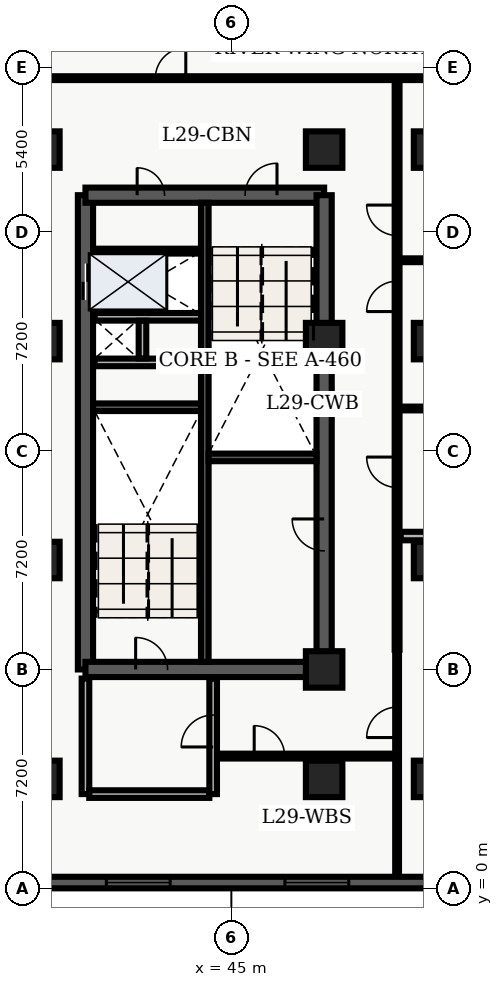
"""IFC4 building model, lengths in metres.
Left out: names, types, materials, properties, quantities, classifications, styles, units other than length and angle.
Written with IfcOpenShell. Run it as: python <this file> out.ifc"""

import sys

from ifc_helpers import new_model, entity, si_unit, converted_unit, direction, frame, origin_with_axes, origin_2d_with_axis, place, context, subcontext, project, spatial, polyline, rectangle, outline, extrude, element, fill, save


model = new_model("IFC4")
c1 = context("Model", 3, precision=1e-05, world=origin_with_axes(), true_north=direction((0.0, 1.0)))
c2 = subcontext(c1, "Body", "Model", "MODEL_VIEW")
j1 = project(units=[si_unit("LENGTHUNIT", "METRE"), converted_unit("PLANEANGLEUNIT", "DEGREE", entity("IfcPlaneAngleMeasure", 0.017), si_unit("PLANEANGLEUNIT", "RADIAN"), dimensions=[0, 0, 0, 0, 0, 0, 0])], contexts=[c1])
p1 = place(None, origin_with_axes())
s1 = spatial("IfcSite", under=j1, at=p1, CompositionType="ELEMENT")
p2 = place(p1, origin_with_axes())
s2 = spatial("IfcBuilding", under=s1, at=p2, CompositionType="ELEMENT")
p3 = place(p2, frame((0.0, 0.0, 120.3), z_axis=(0.0, 0.0, 1.0), x_axis=(1.0, 0.0, 0.0)))
s3 = spatial("IfcBuildingStorey", under=s2, at=p3, CompositionType="ELEMENT", Elevation=120.3)
p4 = place(p3, frame((40.2, 7.2, 0.0), z_axis=(0.0, 0.0, 1.0), x_axis=(0.0, 1.0, 0.0)))
e1 = element("IfcWall", 1, at=p4, inside=s3, PredefinedType="SHEAR", context=c2, shape_type="SweptSolid", body=[
    extrude(outline(polyline([(0.0, -0.25), (15.6, -0.25), (15.6, 0.25), (0.0, 0.25), (0.0, -0.25)])), origin_with_axes(), (0.0, 0.0, 1.0), 3.6),
])
p5 = place(p4, frame((12.75, 0.0, 0.0), z_axis=(0.0, 0.0, 1.0), x_axis=(1.0, 0.0, 0.0)))
e2 = element("IfcOpeningElement", 2, at=p5, cuts=e1, PredefinedType="OPENING", context=c2, shape_type="SweptSolid", body=[
    extrude(rectangle(XDim=1.2, YDim=0.52, at=origin_2d_with_axis()), origin_with_axes(), (0.0, 0.0, 1.0), 2.15),
])
p6 = place(p3, frame((40.2, 7.2, 0.0), z_axis=(0.0, 0.0, 1.0), x_axis=(1.0, 0.0, 0.0)))
e3 = element("IfcWall", 3, at=p6, inside=s3, PredefinedType="SHEAR", context=c2, shape_type="SweptSolid", body=[
    extrude(outline(polyline([(0.0, -0.25), (7.85, -0.25), (7.85, 0.25), (0.0, 0.25), (0.0, -0.25)])), origin_with_axes(), (0.0, 0.0, 1.0), 3.6),
])
p7 = place(p6, frame((2.175, 0.0, 0.0), z_axis=(0.0, 0.0, 1.0), x_axis=(1.0, 0.0, 0.0)))
e4 = element("IfcOpeningElement", 4, at=p7, cuts=e3, PredefinedType="OPENING", context=c2, shape_type="SweptSolid", body=[
    extrude(rectangle(XDim=1.05, YDim=0.52, at=origin_2d_with_axis()), origin_with_axes(), (0.0, 0.0, 1.0), 2.15),
])
p8 = place(p3, frame((40.2, 22.8, 0.0), z_axis=(0.0, 0.0, 1.0), x_axis=(1.0, 0.0, 0.0)))
e5 = element("IfcWall", 5, at=p8, inside=s3, PredefinedType="SHEAR", context=c2, shape_type="SweptSolid", body=[
    extrude(outline(polyline([(0.0, -0.25), (7.85, -0.25), (7.85, 0.25), (0.0, 0.25), (0.0, -0.25)])), origin_with_axes(), (0.0, 0.0, 1.0), 3.6),
])
p9 = place(p8, frame((5.775, 0.0, 0.0), z_axis=(0.0, 0.0, 1.0), x_axis=(1.0, 0.0, 0.0)))
e6 = element("IfcOpeningElement", 6, at=p9, cuts=e5, PredefinedType="OPENING", context=c2, shape_type="SweptSolid", body=[
    extrude(rectangle(XDim=1.05, YDim=0.52, at=origin_2d_with_axis()), origin_with_axes(), (0.0, 0.0, 1.0), 2.15),
])
p10 = place(p8, frame((2.15, 0.0, 0.0), z_axis=(0.0, 0.0, 1.0), x_axis=(1.0, 0.0, 0.0)))
e7 = element("IfcOpeningElement", 7, at=p10, cuts=e5, PredefinedType="OPENING", context=c2, shape_type="SweptSolid", body=[
    extrude(rectangle(XDim=0.9, YDim=0.52, at=origin_2d_with_axis()), origin_with_axes(), (0.0, 0.0, 1.0), 2.15),
])
p11 = place(p3, frame((48.05, 7.2, 0.0), z_axis=(0.0, 0.0, 1.0), x_axis=(0.0, 1.0, 0.0)))
e8 = element("IfcWall", 8, at=p11, inside=s3, PredefinedType="SHEAR", context=c2, shape_type="SweptSolid", body=[
    extrude(outline(polyline([(0.0, -0.25), (15.6, -0.25), (15.6, 0.25), (0.0, 0.25), (0.0, -0.25)])), origin_with_axes(), (0.0, 0.0, 1.0), 3.6),
])
p12 = place(p11, frame((4.425, 0.0, 0.0), z_axis=(0.0, 0.0, 1.0), x_axis=(1.0, 0.0, 0.0)))
e9 = element("IfcOpeningElement", 9, at=p12, cuts=e8, PredefinedType="OPENING", context=c2, shape_type="SweptSolid", body=[
    extrude(rectangle(XDim=1.05, YDim=0.52, at=origin_2d_with_axis()), origin_with_axes(), (0.0, 0.0, 1.0), 2.15),
])
p13 = place(p3, frame((44.125, 7.45, 0.0), z_axis=(0.0, 0.0, 1.0), x_axis=(0.0, 1.0, 0.0)))
e10 = element("IfcWall", 10, at=p13, inside=s3, PredefinedType="SHEAR", context=c2, shape_type="SweptSolid", body=[
    extrude(outline(polyline([(0.0, -0.125), (15.1, -0.125), (15.1, 0.125), (0.0, 0.125), (0.0, -0.125)])), origin_with_axes(), (0.0, 0.0, 1.0), 3.6),
])
for number, where, z_axis, x_axis in (
    (11, (40.45, 15.825, 0.0), (0.0, 0.0, 1.0), (1.0, 0.0, 0.0)),
    (12, (44.25, 14.175, 0.0), (0.0, 0.0, 1.0), (1.0, 0.0, 0.0)),
):
    element("IfcWall", number, at=place(p3, frame(where, z_axis=z_axis, x_axis=x_axis)), inside=s3, PredefinedType="SHEAR", context=c2, shape_type="SweptSolid", body=[
        extrude(outline(polyline([(0.0, -0.125), (3.55, -0.125), (3.55, 0.125), (0.0, 0.125), (0.0, -0.125)])), origin_with_axes(), (0.0, 0.0, 1.0), 3.6),
    ])
for number, where, z_axis, x_axis in (
    (13, (40.5, 17.3, 0.0), (0.0, 0.0, 1.0), (1.0, 0.0, 0.0)),
    (14, (40.5, 18.8, 0.0), (0.0, 0.0, 1.0), (1.0, 0.0, 0.0)),
):
    element("IfcWall", number, at=place(p3, frame(where, z_axis=z_axis, x_axis=x_axis)), inside=s3, PredefinedType="SOLIDWALL", context=c2, shape_type="SweptSolid", body=[
        extrude(outline(polyline([(0.0, -0.125), (3.5, -0.125), (3.5, 0.125), (0.0, 0.125), (0.0, -0.125)])), origin_with_axes(), (0.0, 0.0, 1.0), 2.64),
    ])
p14 = place(p3, frame((42.075, 17.43, 0.0), z_axis=(0.0, 0.0, 1.0), x_axis=(0.0, 1.0, 0.0)))
e15 = element("IfcWall", 15, at=p14, inside=s3, PredefinedType="SOLIDWALL", context=c2, shape_type="SweptSolid", body=[
    extrude(outline(polyline([(0.0, -0.125), (1.24, -0.125), (1.24, 0.125), (0.0, 0.125), (0.0, -0.125)])), origin_with_axes(), (0.0, 0.0, 1.0), 2.64),
])
p15 = place(p3, frame((40.2, 3.1, 0.0), z_axis=(0.0, 0.0, 1.0), x_axis=(0.0, 1.0, 0.0)))
e16 = element("IfcWall", 16, at=p15, inside=s3, PredefinedType="SOLIDWALL", context=c2, shape_type="SweptSolid", body=[
    extrude(outline(polyline([(0.0, -0.125), (3.8, -0.125), (3.8, 0.125), (0.0, 0.125), (0.0, -0.125)])), origin_with_axes(), (0.0, 0.0, 1.0), 2.64),
])
p16 = place(p3, frame((40.325, 3.1, 0.0), z_axis=(0.0, 0.0, 1.0), x_axis=(1.0, 0.0, 0.0)))
e17 = element("IfcWall", 17, at=p16, inside=s3, PredefinedType="SOLIDWALL", context=c2, shape_type="SweptSolid", body=[
    extrude(outline(polyline([(0.0, -0.125), (3.95, -0.125), (3.95, 0.125), (0.0, 0.125), (0.0, -0.125)])), origin_with_axes(), (0.0, 0.0, 1.0), 2.64),
])
p17 = place(p3, frame((44.4, 3.1, 0.0), z_axis=(0.0, 0.0, 1.0), x_axis=(0.0, 1.0, 0.0)))
e18 = element("IfcWall", 18, at=p17, inside=s3, PredefinedType="SOLIDWALL", context=c2, shape_type="SweptSolid", body=[
    extrude(outline(polyline([(0.0, -0.125), (3.8, -0.125), (3.8, 0.125), (0.0, 0.125), (0.0, -0.125)])), origin_with_axes(), (0.0, 0.0, 1.0), 2.64),
])
p18 = place(p17, frame((2.075, 0.0, 0.0), z_axis=(0.0, 0.0, 1.0), x_axis=(1.0, 0.0, 0.0)))
e19 = element("IfcOpeningElement", 19, at=p18, cuts=e18, PredefinedType="OPENING", context=c2, shape_type="SweptSolid", body=[
    extrude(rectangle(XDim=1.05, YDim=0.27, at=origin_2d_with_axis()), origin_with_axes(), (0.0, 0.0, 1.0), 2.15),
])
for number, where, z_axis, x_axis in (
    (20, (38.75, 3.6, 0.0), (0.0, 0.0, 1.0), (1.0, 0.0, 0.0)),
    (21, (38.75, 10.8, 0.0), (0.0, 0.0, 1.0), (1.0, 0.0, 0.0)),
    (22, (38.75, 18.0, 0.0), (0.0, 0.0, 1.0), (1.0, 0.0, 0.0)),
    (23, (38.75, 24.3, 0.0), (0.0, 0.0, 1.0), (1.0, 0.0, 0.0)),
    (24, (48.05, 3.6, 0.0), (0.0, 0.0, 1.0), (1.0, 0.0, 0.0)),
    (25, (48.05, 7.2, 0.0), (0.0, 0.0, 1.0), (1.0, 0.0, 0.0)),
    (26, (48.05, 18.0, 0.0), (0.0, 0.0, 1.0), (1.0, 0.0, 0.0)),
    (27, (48.05, 24.3, 0.0), (0.0, 0.0, 1.0), (1.0, 0.0, 0.0)),
    (28, (51.6, 3.6, 0.0), (0.0, 0.0, 1.0), (1.0, 0.0, 0.0)),
    (29, (51.6, 10.8, 0.0), (0.0, 0.0, 1.0), (1.0, 0.0, 0.0)),
    (30, (51.6, 18.0, 0.0), (0.0, 0.0, 1.0), (1.0, 0.0, 0.0)),
    (31, (51.6, 24.3, 0.0), (0.0, 0.0, 1.0), (1.0, 0.0, 0.0)),
):
    element("IfcColumn", number, at=place(p3, frame(where, z_axis=z_axis, x_axis=x_axis)), inside=s3, PredefinedType="COLUMN", context=c2, shape_type="SweptSolid", body=[
        extrude(rectangle(XDim=1.2, YDim=1.2, at=origin_2d_with_axis()), origin_with_axes(), (0.0, 0.0, 1.0), 3.9),
    ])
p19 = place(p3, frame((40.5, 20.96, 0.0), z_axis=(0.0, 0.0, 1.0), x_axis=(1.0, 0.0, 0.0)))
e32 = element("IfcWall", 32, at=p19, inside=s3, PredefinedType="PARTITIONING", context=c2, shape_type="SweptSolid", body=[
    extrude(outline(polyline([(0.0, -0.08), (3.5, -0.08), (3.5, 0.08), (0.0, 0.08), (0.0, -0.08)])), origin_with_axes(), (0.0, 0.0, 1.0), 2.64),
])
p20 = place(p3, frame((50.45, 7.85, 0.0), z_axis=(0.0, 0.0, 1.0), x_axis=(0.0, 1.0, 0.0)))
e33 = element("IfcWall", 33, at=p20, inside=s3, PredefinedType="PARTITIONING", context=c2, shape_type="SweptSolid", body=[
    extrude(outline(polyline([(0.0, -0.08), (18.8, -0.08), (18.8, 0.08), (0.0, 0.08), (0.0, -0.08)])), origin_with_axes(), (0.0, 0.0, 1.0), 2.64),
])
p21 = place(p20, frame((5.836, 0.0, 0.0), z_axis=(0.0, 0.0, 1.0), x_axis=(1.0, 0.0, 0.0)))
e34 = element("IfcOpeningElement", 34, at=p21, cuts=e33, PredefinedType="OPENING", context=c2, shape_type="SweptSolid", body=[
    extrude(rectangle(XDim=1.0, YDim=0.18, at=origin_2d_with_axis()), origin_with_axes(), (0.0, 0.0, 1.0), 2.15),
])
p22 = place(p20, frame((11.622, 0.0, 0.0), z_axis=(0.0, 0.0, 1.0), x_axis=(1.0, 0.0, 0.0)))
e35 = element("IfcOpeningElement", 35, at=p22, cuts=e33, PredefinedType="OPENING", context=c2, shape_type="SweptSolid", body=[
    extrude(rectangle(XDim=1.0, YDim=0.18, at=origin_2d_with_axis()), origin_with_axes(), (0.0, 0.0, 1.0), 2.15),
])
p23 = place(p20, frame((14.125, 0.0, 0.0), z_axis=(0.0, 0.0, 1.0), x_axis=(1.0, 0.0, 0.0)))
e36 = element("IfcOpeningElement", 36, at=p23, cuts=e33, PredefinedType="OPENING", context=c2, shape_type="SweptSolid", body=[
    extrude(rectangle(XDim=1.0, YDim=0.18, at=origin_2d_with_axis()), origin_with_axes(), (0.0, 0.0, 1.0), 2.15),
])
p24 = place(p3, frame((38.76, 26.65, 0.0), z_axis=(0.0, 0.0, 1.0), x_axis=(1.0, 0.0, 0.0)))
e37 = element("IfcWall", 37, at=p24, inside=s3, PredefinedType="PARTITIONING", context=c2, shape_type="SweptSolid", body=[
    extrude(outline(polyline([(0.0, -0.062), (20.88, -0.062), (20.88, 0.062), (0.0, 0.062), (0.0, -0.062)])), origin_with_axes(), (0.0, 0.0, 1.0), 2.64),
])
p25 = place(p24, frame((4.24, 0.0, 0.0), z_axis=(0.0, 0.0, 1.0), x_axis=(1.0, 0.0, 0.0)))
e38 = element("IfcOpeningElement", 38, at=p25, cuts=e37, PredefinedType="OPENING", context=c2, shape_type="SweptSolid", body=[
    extrude(rectangle(XDim=1.0, YDim=0.145, at=origin_2d_with_axis()), origin_with_axes(), (0.0, 0.0, 1.0), 2.15),
])
p26 = place(p3, frame((44.55, 4.35, 0.0), z_axis=(0.0, 0.0, 1.0), x_axis=(1.0, 0.0, 0.0)))
e39 = element("IfcWall", 39, at=p26, inside=s3, PredefinedType="PARTITIONING", context=c2, shape_type="SweptSolid", body=[
    extrude(outline(polyline([(0.0, -0.08), (5.9, -0.08), (5.9, 0.08), (0.0, 0.08), (0.0, -0.08)])), origin_with_axes(), (0.0, 0.0, 1.0), 2.64),
])
p27 = place(p26, frame((1.7, 0.0, 0.0), z_axis=(0.0, 0.0, 1.0), x_axis=(1.0, 0.0, 0.0)))
e40 = element("IfcOpeningElement", 40, at=p27, cuts=e39, PredefinedType="OPENING", context=c2, shape_type="SweptSolid", body=[
    extrude(rectangle(XDim=1.0, YDim=0.18, at=origin_2d_with_axis()), origin_with_axes(), (0.0, 0.0, 1.0), 2.15),
])
p28 = place(p3, frame((50.45, 0.36, 0.0), z_axis=(0.0, 0.0, 1.0), x_axis=(0.0, 1.0, 0.0)))
e41 = element("IfcWall", 41, at=p28, inside=s3, PredefinedType="PARTITIONING", context=c2, shape_type="SweptSolid", body=[
    extrude(outline(polyline([(0.0, -0.062), (7.49, -0.062), (7.49, 0.062), (0.0, 0.062), (0.0, -0.062)])), origin_with_axes(), (0.0, 0.0, 1.0), 2.64),
])
p29 = place(p28, frame((5.1, 0.0, 0.0), z_axis=(0.0, 0.0, 1.0), x_axis=(1.0, 0.0, 0.0)))
e42 = element("IfcOpeningElement", 42, at=p29, cuts=e41, PredefinedType="OPENING", context=c2, shape_type="SweptSolid", body=[
    extrude(rectangle(XDim=1.0, YDim=0.145, at=origin_2d_with_axis()), origin_with_axes(), (0.0, 0.0, 1.0), 2.15),
])
p30 = place(p3, frame((50.57, 11.588, 0.0), z_axis=(0.0, 0.0, 1.0), x_axis=(1.0, 0.0, 0.0)))
e43 = element("IfcWall", 43, at=p30, inside=s3, PredefinedType="PARTITIONING", context=c2, shape_type="SweptSolid", body=[
    extrude(outline(polyline([(0.0, -0.14), (9.055, -0.14), (9.055, 0.14), (0.0, 0.14), (0.0, -0.14)])), origin_with_axes(), (0.0, 0.0, 1.0), 2.64),
])
p31 = place(p30, frame((4.525, 0.0, 0.0), z_axis=(0.0, 0.0, 1.0), x_axis=(1.0, 0.0, 0.0)))
e44 = element("IfcOpeningElement", 44, at=p31, cuts=e43, PredefinedType="OPENING", context=c2, shape_type="SweptSolid", body=[
    extrude(rectangle(XDim=0.95, YDim=0.3, at=origin_2d_with_axis()), origin_with_axes(), (0.0, 0.0, 1.0), 2.15),
])
for number, where, z_axis, x_axis in (
    (45, (50.57, 15.784, 0.0), (0.0, 0.0, 1.0), (1.0, 0.0, 0.0)),
    (46, (50.57, 20.66, 0.0), (0.0, 0.0, 1.0), (1.0, 0.0, 0.0)),
):
    element("IfcWall", number, at=place(p3, frame(where, z_axis=z_axis, x_axis=x_axis)), inside=s3, PredefinedType="PARTITIONING", context=c2, shape_type="SweptSolid", body=[
        extrude(outline(polyline([(0.0, -0.062), (9.055, -0.062), (9.055, 0.062), (0.0, 0.062), (0.0, -0.062)])), origin_with_axes(), (0.0, 0.0, 1.0), 2.64),
    ])
p32 = place(p3, frame((57.22, 0.19, 0.0), z_axis=(0.0, 0.0, 1.0), x_axis=(-1.0, 0.0, 0.0)))
e47 = element("IfcWall", 47, at=p32, inside=s3, PredefinedType="SOLIDWALL", context=c2, shape_type="SweptSolid", body=[
    extrude(outline(polyline([(0.0, -0.19), (18.82, -0.19), (18.82, 0.19), (0.0, 0.19), (0.0, -0.19)])), origin_with_axes(), (0.0, 0.0, 1.0), 3.6),
])
p33 = place(p32, frame((3.537, 0.0, 0.45), z_axis=(0.0, 0.0, 1.0), x_axis=(1.0, 0.0, 0.0)))
e48 = element("IfcOpeningElement", 48, at=p33, cuts=e47, PredefinedType="OPENING", context=c2, shape_type="SweptSolid", body=[
    extrude(rectangle(XDim=2.1, YDim=0.4, at=origin_2d_with_axis()), origin_with_axes(), (0.0, 0.0, 1.0), 2.2),
])
p34 = place(p32, frame((9.41, 0.0, 0.45), z_axis=(0.0, 0.0, 1.0), x_axis=(1.0, 0.0, 0.0)))
e49 = element("IfcOpeningElement", 49, at=p34, cuts=e47, PredefinedType="OPENING", context=c2, shape_type="SweptSolid", body=[
    extrude(rectangle(XDim=2.1, YDim=0.4, at=origin_2d_with_axis()), origin_with_axes(), (0.0, 0.0, 1.0), 2.2),
])
p35 = place(p32, frame((15.283, 0.0, 0.45), z_axis=(0.0, 0.0, 1.0), x_axis=(1.0, 0.0, 0.0)))
e50 = element("IfcOpeningElement", 50, at=p35, cuts=e47, PredefinedType="OPENING", context=c2, shape_type="SweptSolid", body=[
    extrude(rectangle(XDim=2.1, YDim=0.4, at=origin_2d_with_axis()), origin_with_axes(), (0.0, 0.0, 1.0), 2.2),
])
p36 = place(p4, frame((12.75, 0.0, 0.0), z_axis=(0.0, 0.0, 1.0), x_axis=(1.0, 0.0, 0.0)))
e51 = element("IfcDoor", 51, at=p36, inside=s3, OperationType="DOUBLE_DOOR_SLIDING", PredefinedType="DOOR", context=c2, shape_type="SweptSolid", body=[
    extrude(rectangle(XDim=1.2, YDim=0.09, at=origin_2d_with_axis()), origin_with_axes(), (0.0, 0.0, 1.0), 2.15),
])
fill(e2, e51)
p37 = place(p6, frame((2.175, 0.0, 0.0), z_axis=(0.0, 0.0, 1.0), x_axis=(1.0, 0.0, 0.0)))
e52 = element("IfcDoor", 52, at=p37, inside=s3, OperationType="SINGLE_SWING_LEFT", PredefinedType="DOOR", context=c2, shape_type="SweptSolid", body=[
    extrude(rectangle(XDim=1.05, YDim=0.09, at=origin_2d_with_axis()), origin_with_axes(), (0.0, 0.0, 1.0), 2.15),
])
fill(e4, e52)
p38 = place(p8, frame((5.775, 0.0, 0.0), z_axis=(0.0, 0.0, 1.0), x_axis=(1.0, 0.0, 0.0)))
e53 = element("IfcDoor", 53, at=p38, inside=s3, OperationType="SINGLE_SWING_RIGHT", PredefinedType="DOOR", context=c2, shape_type="SweptSolid", body=[
    extrude(rectangle(XDim=1.05, YDim=0.09, at=origin_2d_with_axis()), origin_with_axes(), (0.0, 0.0, 1.0), 2.15),
])
fill(e6, e53)
p39 = place(p17, frame((2.075, 0.0, 0.0), z_axis=(0.0, 0.0, 1.0), x_axis=(1.0, 0.0, 0.0)))
e54 = element("IfcDoor", 54, at=p39, inside=s3, OperationType="SINGLE_SWING_LEFT", PredefinedType="DOOR", context=c2, shape_type="SweptSolid", body=[
    extrude(rectangle(XDim=1.05, YDim=0.09, at=origin_2d_with_axis()), origin_with_axes(), (0.0, 0.0, 1.0), 2.15),
])
fill(e19, e54)
p40 = place(p8, frame((2.15, 0.0, 0.0), z_axis=(0.0, 0.0, 1.0), x_axis=(1.0, 0.0, 0.0)))
e55 = element("IfcDoor", 55, at=p40, inside=s3, OperationType="SINGLE_SWING_LEFT", PredefinedType="DOOR", context=c2, shape_type="SweptSolid", body=[
    extrude(rectangle(XDim=0.9, YDim=0.09, at=origin_2d_with_axis()), origin_with_axes(), (0.0, 0.0, 1.0), 2.15),
])
fill(e7, e55)
p41 = place(p11, frame((4.425, 0.0, 0.0), z_axis=(0.0, 0.0, 1.0), x_axis=(1.0, 0.0, 0.0)))
e56 = element("IfcDoor", 56, at=p41, inside=s3, OperationType="SINGLE_SWING_RIGHT", PredefinedType="DOOR", context=c2, shape_type="SweptSolid", body=[
    extrude(rectangle(XDim=1.05, YDim=0.09, at=origin_2d_with_axis()), origin_with_axes(), (0.0, 0.0, 1.0), 2.15),
])
fill(e9, e56)
p42 = place(p26, frame((1.7, 0.0, 0.0), z_axis=(0.0, 0.0, 1.0), x_axis=(1.0, 0.0, 0.0)))
e57 = element("IfcDoor", 57, at=p42, inside=s3, OperationType="SINGLE_SWING_LEFT", PredefinedType="DOOR", context=c2, shape_type="SweptSolid", body=[
    extrude(rectangle(XDim=1.0, YDim=0.09, at=origin_2d_with_axis()), origin_with_axes(), (0.0, 0.0, 1.0), 2.15),
])
fill(e40, e57)
p43 = place(p28, frame((5.1, 0.0, 0.0), z_axis=(0.0, 0.0, 1.0), x_axis=(1.0, 0.0, 0.0)))
e58 = element("IfcDoor", 58, at=p43, inside=s3, OperationType="SINGLE_SWING_LEFT", PredefinedType="DOOR", context=c2, shape_type="SweptSolid", body=[
    extrude(rectangle(XDim=1.0, YDim=0.075, at=origin_2d_with_axis()), origin_with_axes(), (0.0, 0.0, 1.0), 2.15),
])
fill(e42, e58)
p44 = place(p24, frame((4.24, 0.0, 0.0), z_axis=(0.0, 0.0, 1.0), x_axis=(1.0, 0.0, 0.0)))
e59 = element("IfcDoor", 59, at=p44, inside=s3, OperationType="SINGLE_SWING_RIGHT", PredefinedType="DOOR", context=c2, shape_type="SweptSolid", body=[
    extrude(rectangle(XDim=1.0, YDim=0.075, at=origin_2d_with_axis()), origin_with_axes(), (0.0, 0.0, 1.0), 2.15),
])
fill(e38, e59)
p45 = place(p20, frame((5.836, 0.0, 0.0), z_axis=(0.0, 0.0, 1.0), x_axis=(1.0, 0.0, 0.0)))
e60 = element("IfcDoor", 60, at=p45, inside=s3, OperationType="SINGLE_SWING_RIGHT", PredefinedType="DOOR", context=c2, shape_type="SweptSolid", body=[
    extrude(rectangle(XDim=1.0, YDim=0.09, at=origin_2d_with_axis()), origin_with_axes(), (0.0, 0.0, 1.0), 2.15),
])
fill(e34, e60)
p46 = place(p20, frame((11.622, 0.0, 0.0), z_axis=(0.0, 0.0, 1.0), x_axis=(1.0, 0.0, 0.0)))
e61 = element("IfcDoor", 61, at=p46, inside=s3, OperationType="SINGLE_SWING_LEFT", PredefinedType="DOOR", context=c2, shape_type="SweptSolid", body=[
    extrude(rectangle(XDim=1.0, YDim=0.09, at=origin_2d_with_axis()), origin_with_axes(), (0.0, 0.0, 1.0), 2.15),
])
fill(e35, e61)
p47 = place(p20, frame((14.125, 0.0, 0.0), z_axis=(0.0, 0.0, 1.0), x_axis=(1.0, 0.0, 0.0)))
e62 = element("IfcDoor", 62, at=p47, inside=s3, OperationType="SINGLE_SWING_RIGHT", PredefinedType="DOOR", context=c2, shape_type="SweptSolid", body=[
    extrude(rectangle(XDim=1.0, YDim=0.09, at=origin_2d_with_axis()), origin_with_axes(), (0.0, 0.0, 1.0), 2.15),
])
fill(e36, e62)
p48 = place(p32, frame((9.41, 0.0, 0.45), z_axis=(0.0, 0.0, 1.0), x_axis=(1.0, 0.0, 0.0)))
e63 = element("IfcWindow", 63, at=p48, inside=s3, PredefinedType="WINDOW", context=c2, shape_type="SweptSolid", body=[
    extrude(rectangle(XDim=2.1, YDim=0.09, at=origin_2d_with_axis()), origin_with_axes(), (0.0, 0.0, 1.0), 2.2),
])
fill(e49, e63)
p49 = place(p32, frame((15.283, 0.0, 0.45), z_axis=(0.0, 0.0, 1.0), x_axis=(1.0, 0.0, 0.0)))
e64 = element("IfcWindow", 64, at=p49, inside=s3, PredefinedType="WINDOW", context=c2, shape_type="SweptSolid", body=[
    extrude(rectangle(XDim=2.1, YDim=0.09, at=origin_2d_with_axis()), origin_with_axes(), (0.0, 0.0, 1.0), 2.2),
])
fill(e50, e64)
save(model, sys.argv[1])
